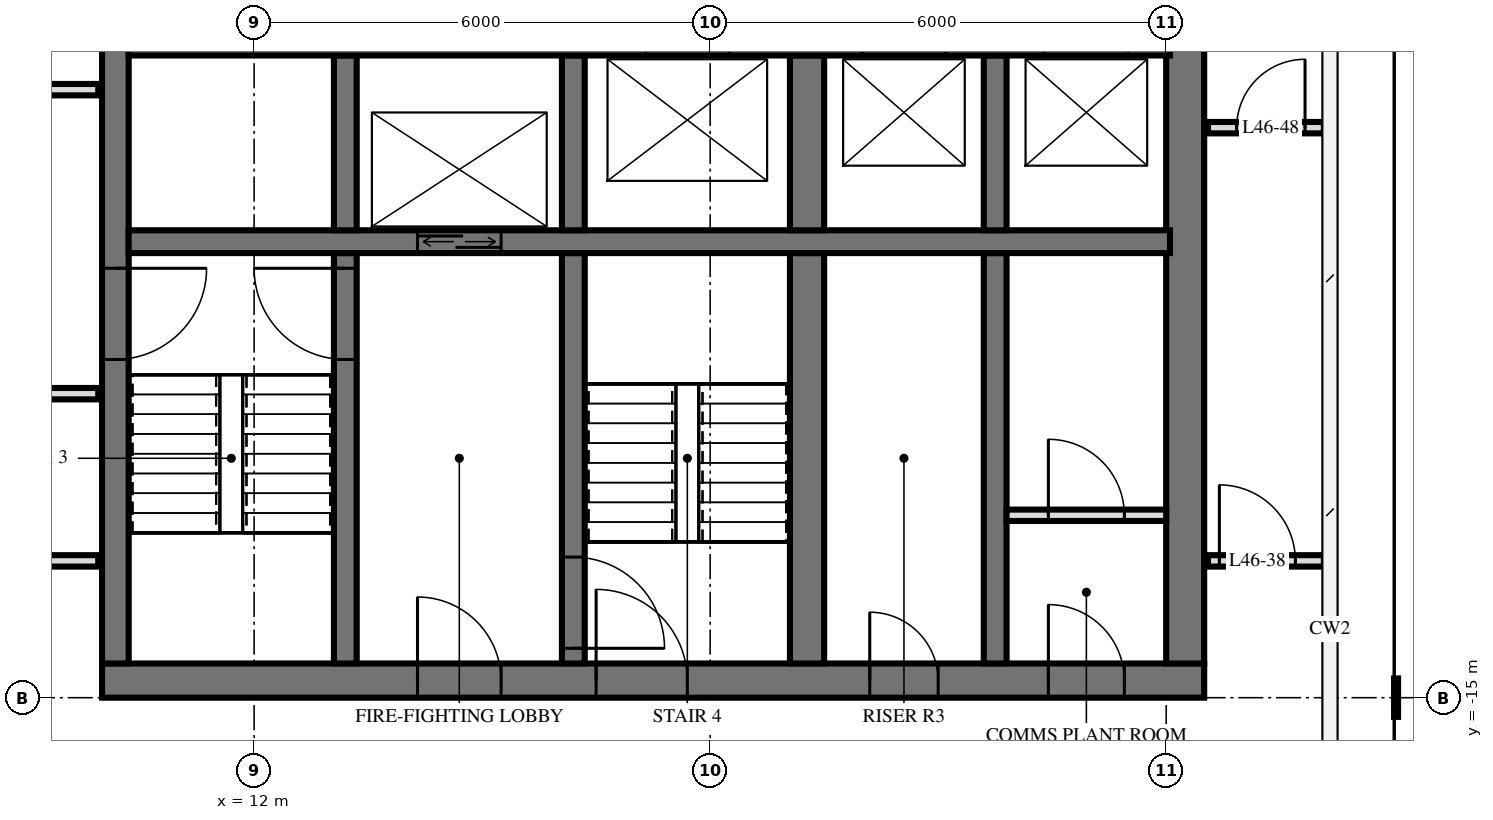
"""IFC4 building model, lengths in metres.
Left out: names, types, materials, properties, quantities, classifications, styles, units other than length and angle.
Written with IfcOpenShell. Run it as: python <this file> out.ifc"""

import sys

from ifc_helpers import new_model, si_unit, direction, frame, frame_2d, origin, place, context, subcontext, project, spatial, rectangle, extrude, element, fill, save


model = new_model("IFC4")
c1 = context("Model", 3, precision=1e-05, world=origin(), true_north=direction((0.0, 1.0)))
c2 = subcontext(c1, "Body", "Model", "MODEL_VIEW")
j1 = project(units=[si_unit("LENGTHUNIT", "METRE"), si_unit("PLANEANGLEUNIT", "RADIAN")], contexts=[c1])
p1 = place(None, origin())
s1 = spatial("IfcSite", under=j1, at=p1, CompositionType="ELEMENT")
p2 = place(p1, origin())
s2 = spatial("IfcBuilding", under=s1, at=p2, CompositionType="ELEMENT")
p3 = place(p2, frame((0.0, 0.0, 177.6)))
s3 = spatial("IfcBuildingStorey", under=s2, at=p3, CompositionType="ELEMENT", Elevation=177.6)
p4 = place(p3, frame((10.0, -14.775, 0.0), z_axis=(0.0, 0.0, 1.0), x_axis=(1.0, 0.0, 0.0)))
e1 = element("IfcWall", 1, at=p4, inside=s3, PredefinedType="SHEAR", context=c2, shape_type="SweptSolid", body=[
    extrude(rectangle(XDim=14.5, YDim=0.45, at=frame_2d((7.25, 0.0))), origin(), (0.0, 0.0, 1.0), 6.0),
])
p5 = place(p4, frame((6.5, 0.0, 0.0)))
e2 = element("IfcOpeningElement", 2, at=p5, cuts=e1, PredefinedType="OPENING", context=c2, shape_type="SweptSolid", body=[
    extrude(rectangle(XDim=1.2, YDim=2.1, at=frame_2d((0.6, 1.05))), frame((0.0, 0.235, 0.0), z_axis=(0.0, -1.0, 0.0), x_axis=(1.0, 0.0, 0.0)), (0.0, 0.0, 1.0), 0.47),
])
p6 = place(p4, frame((4.15, 0.0, 0.0)))
e3 = element("IfcOpeningElement", 3, at=p6, cuts=e1, PredefinedType="OPENING", context=c2, shape_type="SweptSolid", body=[
    extrude(rectangle(XDim=1.1, YDim=2.1, at=frame_2d((0.55, 1.05))), frame((0.0, 0.235, 0.0), z_axis=(0.0, -1.0, 0.0), x_axis=(1.0, 0.0, 0.0)), (0.0, 0.0, 1.0), 0.47),
])
p7 = place(p4, frame((10.1, 0.0, 0.0)))
e4 = element("IfcOpeningElement", 4, at=p7, cuts=e1, PredefinedType="OPENING", context=c2, shape_type="SweptSolid", body=[
    extrude(rectangle(XDim=0.9, YDim=2.1, at=frame_2d((0.45, 1.05))), frame((0.0, 0.235, 0.0), z_axis=(0.0, -1.0, 0.0), x_axis=(1.0, 0.0, 0.0)), (0.0, 0.0, 1.0), 0.47),
])
p8 = place(p4, frame((12.45, 0.0, 0.0)))
e5 = element("IfcOpeningElement", 5, at=p8, cuts=e1, PredefinedType="OPENING", context=c2, shape_type="SweptSolid", body=[
    extrude(rectangle(XDim=1.0, YDim=2.1, at=frame_2d((0.5, 1.05))), frame((0.0, 0.235, 0.0), z_axis=(0.0, -1.0, 0.0), x_axis=(1.0, 0.0, 0.0)), (0.0, 0.0, 1.0), 0.47),
])
p9 = place(p3, frame((10.175, -14.55, 0.0), z_axis=(0.0, 0.0, 1.0), x_axis=(0.0, 1.0, 0.0)))
e6 = element("IfcWall", 6, at=p9, inside=s3, PredefinedType="SHEAR", context=c2, shape_type="SweptSolid", body=[
    extrude(rectangle(XDim=14.1, YDim=0.35, at=frame_2d((7.05, 0.0))), origin(), (0.0, 0.0, 1.0), 6.0),
])
p10 = place(p9, frame((8.4, 0.0, 0.0)))
e7 = element("IfcOpeningElement", 7, at=p10, cuts=e6, PredefinedType="OPENING", context=c2, shape_type="SweptSolid", body=[
    extrude(rectangle(XDim=1.4, YDim=2.4, at=frame_2d((0.7, 1.2))), frame((0.0, 0.185, 0.0), z_axis=(0.0, -1.0, 0.0), x_axis=(1.0, 0.0, 0.0)), (0.0, 0.0, 1.0), 0.37),
])
p11 = place(p9, frame((10.0, 0.0, 0.0)))
e8 = element("IfcOpeningElement", 8, at=p11, cuts=e6, PredefinedType="OPENING", context=c2, shape_type="SweptSolid", body=[
    extrude(rectangle(XDim=1.4, YDim=2.4, at=frame_2d((0.7, 1.2))), frame((0.0, 0.185, 0.0), z_axis=(0.0, -1.0, 0.0), x_axis=(1.0, 0.0, 0.0)), (0.0, 0.0, 1.0), 0.37),
])
p12 = place(p9, frame((4.0, 0.0, 0.0)))
e9 = element("IfcOpeningElement", 9, at=p12, cuts=e6, PredefinedType="OPENING", context=c2, shape_type="SweptSolid", body=[
    extrude(rectangle(XDim=1.2, YDim=2.1, at=frame_2d((0.6, 1.05))), frame((0.0, 0.185, 0.0), z_axis=(0.0, -1.0, 0.0), x_axis=(1.0, 0.0, 0.0)), (0.0, 0.0, 1.0), 0.37),
])
p13 = place(p3, frame((24.25, -14.55, 0.0), z_axis=(0.0, 0.0, 1.0), x_axis=(0.0, 1.0, 0.0)))
e10 = element("IfcWall", 10, at=p13, inside=s3, PredefinedType="SHEAR", context=c2, shape_type="SweptSolid", body=[
    extrude(rectangle(XDim=14.1, YDim=0.5, at=frame_2d((7.05, 0.0))), origin(), (0.0, 0.0, 1.0), 6.0),
])
p14 = place(p3, frame((10.35, -6.4, 0.0), z_axis=(0.0, 0.0, 1.0), x_axis=(1.0, 0.0, 0.0)))
e11 = element("IfcWall", 11, at=p14, inside=s3, PredefinedType="SHEAR", context=c2, shape_type="SweptSolid", body=[
    extrude(rectangle(XDim=13.7, YDim=0.3, at=frame_2d((6.85, 0.0))), origin(), (0.0, 0.0, 1.0), 6.0),
])
p15 = place(p14, frame((9.65, 0.0, 0.0)))
e12 = element("IfcOpeningElement", 12, at=p15, cuts=e11, PredefinedType="OPENING", context=c2, shape_type="SweptSolid", body=[
    extrude(rectangle(XDim=1.1, YDim=2.1, at=frame_2d((0.55, 1.05))), frame((0.0, 0.16, 0.0), z_axis=(0.0, -1.0, 0.0), x_axis=(1.0, 0.0, 0.0)), (0.0, 0.0, 1.0), 0.32),
])
p16 = place(p14, frame((12.05, 0.0, 0.0)))
e13 = element("IfcOpeningElement", 13, at=p16, cuts=e11, PredefinedType="OPENING", context=c2, shape_type="SweptSolid", body=[
    extrude(rectangle(XDim=1.1, YDim=2.1, at=frame_2d((0.55, 1.05))), frame((0.0, 0.16, 0.0), z_axis=(0.0, -1.0, 0.0), x_axis=(1.0, 0.0, 0.0)), (0.0, 0.0, 1.0), 0.32),
])
p17 = place(p14, frame((6.8, 0.0, 0.0)))
e14 = element("IfcOpeningElement", 14, at=p17, cuts=e11, PredefinedType="OPENING", context=c2, shape_type="SweptSolid", body=[
    extrude(rectangle(XDim=1.1, YDim=2.1, at=frame_2d((0.55, 1.05))), frame((0.0, 0.16, 0.0), z_axis=(0.0, -1.0, 0.0), x_axis=(1.0, 0.0, 0.0)), (0.0, 0.0, 1.0), 0.32),
])
p18 = place(p3, frame((10.35, -9.0, 0.0), z_axis=(0.0, 0.0, 1.0), x_axis=(1.0, 0.0, 0.0)))
e15 = element("IfcWall", 15, at=p18, inside=s3, PredefinedType="SHEAR", context=c2, shape_type="SweptSolid", body=[
    extrude(rectangle(XDim=13.7, YDim=0.3, at=frame_2d((6.85, 0.0))), origin(), (0.0, 0.0, 1.0), 6.0),
])
p19 = place(p18, frame((3.8, 0.0, 0.0)))
e16 = element("IfcOpeningElement", 16, at=p19, cuts=e15, PredefinedType="OPENING", context=c2, shape_type="SweptSolid", body=[
    extrude(rectangle(XDim=1.1, YDim=2.1, at=frame_2d((0.55, 1.05))), frame((0.0, 0.16, 0.0), z_axis=(0.0, -1.0, 0.0), x_axis=(1.0, 0.0, 0.0)), (0.0, 0.0, 1.0), 0.32),
])
p20 = place(p3, frame((13.2, -8.85, 0.0), z_axis=(0.0, 0.0, 1.0), x_axis=(0.0, 1.0, 0.0)))
e17 = element("IfcWall", 17, at=p20, inside=s3, PredefinedType="SHEAR", context=c2, shape_type="SweptSolid", body=[
    extrude(rectangle(XDim=2.3, YDim=0.3, at=frame_2d((1.15, 0.0))), origin(), (0.0, 0.0, 1.0), 6.0),
])
p21 = place(p3, frame((13.2, -14.55, 0.0), z_axis=(0.0, 0.0, 1.0), x_axis=(0.0, 1.0, 0.0)))
e18 = element("IfcWall", 18, at=p21, inside=s3, PredefinedType="SHEAR", context=c2, shape_type="SweptSolid", body=[
    extrude(rectangle(XDim=5.4, YDim=0.3, at=frame_2d((2.7, 0.0))), origin(), (0.0, 0.0, 1.0), 6.0),
])
p22 = place(p21, frame((4.0, 0.0, 0.0)))
e19 = element("IfcOpeningElement", 19, at=p22, cuts=e18, PredefinedType="OPENING", context=c2, shape_type="SweptSolid", body=[
    extrude(rectangle(XDim=1.2, YDim=2.1, at=frame_2d((0.6, 1.05))), frame((0.0, 0.16, 0.0), z_axis=(0.0, -1.0, 0.0), x_axis=(1.0, 0.0, 0.0)), (0.0, 0.0, 1.0), 0.32),
])
p23 = place(p3, frame((16.2, -8.85, 0.0), z_axis=(0.0, 0.0, 1.0), x_axis=(0.0, 1.0, 0.0)))
e20 = element("IfcWall", 20, at=p23, inside=s3, PredefinedType="SHEAR", context=c2, shape_type="SweptSolid", body=[
    extrude(rectangle(XDim=2.3, YDim=0.3, at=frame_2d((1.15, 0.0))), origin(), (0.0, 0.0, 1.0), 6.0),
])
p24 = place(p3, frame((16.2, -14.55, 0.0), z_axis=(0.0, 0.0, 1.0), x_axis=(0.0, 1.0, 0.0)))
e21 = element("IfcWall", 21, at=p24, inside=s3, PredefinedType="SHEAR", context=c2, shape_type="SweptSolid", body=[
    extrude(rectangle(XDim=5.4, YDim=0.3, at=frame_2d((2.7, 0.0))), origin(), (0.0, 0.0, 1.0), 6.0),
])
p25 = place(p24, frame((0.2, 0.0, 0.0)))
e22 = element("IfcOpeningElement", 22, at=p25, cuts=e21, PredefinedType="OPENING", context=c2, shape_type="SweptSolid", body=[
    extrude(rectangle(XDim=1.2, YDim=2.1, at=frame_2d((0.6, 1.05))), frame((0.0, 0.16, 0.0), z_axis=(0.0, -1.0, 0.0), x_axis=(1.0, 0.0, 0.0)), (0.0, 0.0, 1.0), 0.32),
])
p26 = place(p3, frame((19.275, -8.85, 0.0), z_axis=(0.0, 0.0, 1.0), x_axis=(0.0, 1.0, 0.0)))
e23 = element("IfcWall", 23, at=p26, inside=s3, PredefinedType="SHEAR", context=c2, shape_type="SweptSolid", body=[
    extrude(rectangle(XDim=2.3, YDim=0.45, at=frame_2d((1.15, 0.0))), origin(), (0.0, 0.0, 1.0), 6.0),
])
p27 = place(p3, frame((19.275, -14.55, 0.0), z_axis=(0.0, 0.0, 1.0), x_axis=(0.0, 1.0, 0.0)))
e24 = element("IfcWall", 24, at=p27, inside=s3, PredefinedType="SHEAR", context=c2, shape_type="SweptSolid", body=[
    extrude(rectangle(XDim=5.4, YDim=0.45, at=frame_2d((2.7, 0.0))), origin(), (0.0, 0.0, 1.0), 6.0),
])
p28 = place(p3, frame((21.75, -8.85, 0.0), z_axis=(0.0, 0.0, 1.0), x_axis=(0.0, 1.0, 0.0)))
e25 = element("IfcWall", 25, at=p28, inside=s3, PredefinedType="SHEAR", context=c2, shape_type="SweptSolid", body=[
    extrude(rectangle(XDim=2.3, YDim=0.3, at=frame_2d((1.15, 0.0))), origin(), (0.0, 0.0, 1.0), 6.0),
])
p29 = place(p3, frame((21.75, -14.55, 0.0), z_axis=(0.0, 0.0, 1.0), x_axis=(0.0, 1.0, 0.0)))
e26 = element("IfcWall", 26, at=p29, inside=s3, PredefinedType="SHEAR", context=c2, shape_type="SweptSolid", body=[
    extrude(rectangle(XDim=5.4, YDim=0.3, at=frame_2d((2.7, 0.0))), origin(), (0.0, 0.0, 1.0), 6.0),
])
p30 = place(p3, frame((21.9, -12.6, 0.0), z_axis=(0.0, 0.0, 1.0), x_axis=(1.0, 0.0, 0.0)))
e27 = element("IfcWall", 27, at=p30, inside=s3, PredefinedType="PARTITIONING", context=c2, shape_type="SweptSolid", body=[
    extrude(rectangle(XDim=2.1, YDim=0.15, at=frame_2d((1.05, 0.0))), origin(), (0.0, 0.0, 1.0), 5.7),
])
p31 = place(p30, frame((0.55, 0.0, 0.0)))
e28 = element("IfcOpeningElement", 28, at=p31, cuts=e27, PredefinedType="OPENING", context=c2, shape_type="SweptSolid", body=[
    extrude(rectangle(XDim=1.0, YDim=2.1, at=frame_2d((0.5, 1.05))), frame((0.0, 0.085, 0.0), z_axis=(0.0, -1.0, 0.0), x_axis=(1.0, 0.0, 0.0)), (0.0, 0.0, 1.0), 0.17),
])
p32 = place(p3, frame((-9.95, -13.2, 0.0), z_axis=(0.0, 0.0, 1.0), x_axis=(1.0, 0.0, 0.0)))
e29 = element("IfcWall", 29, at=p32, inside=s3, PredefinedType="PARTITIONING", context=c2, shape_type="SweptSolid", body=[
    extrude(rectangle(XDim=19.9, YDim=0.15, at=frame_2d((9.95, 0.0))), origin(), (0.0, 0.0, 1.0), 5.7),
])
p33 = place(p32, frame((7.0, 0.0, 0.0)))
e30 = element("IfcOpeningElement", 30, at=p33, cuts=e29, PredefinedType="OPENING", context=c2, shape_type="SweptSolid", body=[
    extrude(rectangle(XDim=1.0, YDim=2.1, at=frame_2d((0.5, 1.05))), frame((0.0, 0.085, 0.0), z_axis=(0.0, -1.0, 0.0), x_axis=(1.0, 0.0, 0.0)), (0.0, 0.0, 1.0), 0.17),
])
p34 = place(p3, frame((24.55, -13.2, 0.0), z_axis=(0.0, 0.0, 1.0), x_axis=(1.0, 0.0, 0.0)))
e31 = element("IfcWall", 31, at=p34, inside=s3, PredefinedType="PARTITIONING", context=c2, shape_type="SweptSolid", body=[
    extrude(rectangle(XDim=1.525, YDim=0.15, at=frame_2d((0.762, 0.0))), origin(), (0.0, 0.0, 1.0), 5.7),
])
p35 = place(p34, frame((0.15, 0.0, 0.0)))
e32 = element("IfcOpeningElement", 32, at=p35, cuts=e31, PredefinedType="OPENING", context=c2, shape_type="SweptSolid", body=[
    extrude(rectangle(XDim=1.0, YDim=2.1, at=frame_2d((0.5, 1.05))), frame((0.0, 0.085, 0.0), z_axis=(0.0, -1.0, 0.0), x_axis=(1.0, 0.0, 0.0)), (0.0, 0.0, 1.0), 0.17),
])
p36 = place(p3, frame((-9.95, -11.0, 0.0), z_axis=(0.0, 0.0, 1.0), x_axis=(1.0, 0.0, 0.0)))
e33 = element("IfcWall", 33, at=p36, inside=s3, PredefinedType="PARTITIONING", context=c2, shape_type="SweptSolid", body=[
    extrude(rectangle(XDim=19.9, YDim=0.15, at=frame_2d((9.95, 0.0))), origin(), (0.0, 0.0, 1.0), 5.7),
])
p37 = place(p36, frame((9.45, 0.0, 0.0)))
e34 = element("IfcOpeningElement", 34, at=p37, cuts=e33, PredefinedType="OPENING", context=c2, shape_type="SweptSolid", body=[
    extrude(rectangle(XDim=1.0, YDim=2.1, at=frame_2d((0.5, 1.05))), frame((0.0, 0.085, 0.0), z_axis=(0.0, -1.0, 0.0), x_axis=(1.0, 0.0, 0.0)), (0.0, 0.0, 1.0), 0.17),
])
p38 = place(p36, frame((15.45, 0.0, 0.0)))
e35 = element("IfcOpeningElement", 35, at=p38, cuts=e33, PredefinedType="OPENING", context=c2, shape_type="SweptSolid", body=[
    extrude(rectangle(XDim=1.0, YDim=2.1, at=frame_2d((0.5, 1.05))), frame((0.0, 0.085, 0.0), z_axis=(0.0, -1.0, 0.0), x_axis=(1.0, 0.0, 0.0)), (0.0, 0.0, 1.0), 0.17),
])
p39 = place(p3, frame((24.55, -7.5, 0.0), z_axis=(0.0, 0.0, 1.0), x_axis=(1.0, 0.0, 0.0)))
e36 = element("IfcWall", 36, at=p39, inside=s3, PredefinedType="PARTITIONING", context=c2, shape_type="SweptSolid", body=[
    extrude(rectangle(XDim=1.525, YDim=0.15, at=frame_2d((0.762, 0.0))), origin(), (0.0, 0.0, 1.0), 5.7),
])
p40 = place(p39, frame((0.377, 0.0, 0.0)))
e37 = element("IfcOpeningElement", 37, at=p40, cuts=e36, PredefinedType="OPENING", context=c2, shape_type="SweptSolid", body=[
    extrude(rectangle(XDim=0.9, YDim=2.1, at=frame_2d((0.45, 1.05))), frame((0.0, 0.085, 0.0), z_axis=(0.0, -1.0, 0.0), x_axis=(1.0, 0.0, 0.0)), (0.0, 0.0, 1.0), 0.17),
])
p41 = place(p3, frame((-9.95, -7.0, 0.0), z_axis=(0.0, 0.0, 1.0), x_axis=(1.0, 0.0, 0.0)))
e38 = element("IfcWall", 38, at=p41, inside=s3, PredefinedType="PARTITIONING", context=c2, shape_type="SweptSolid", body=[
    extrude(rectangle(XDim=19.9, YDim=0.15, at=frame_2d((9.95, 0.0))), origin(), (0.0, 0.0, 1.0), 5.7),
])
p42 = place(p41, frame((9.45, 0.0, 0.0)))
e39 = element("IfcOpeningElement", 39, at=p42, cuts=e38, PredefinedType="OPENING", context=c2, shape_type="SweptSolid", body=[
    extrude(rectangle(XDim=1.0, YDim=2.1, at=frame_2d((0.5, 1.05))), frame((0.0, 0.085, 0.0), z_axis=(0.0, -1.0, 0.0), x_axis=(1.0, 0.0, 0.0)), (0.0, 0.0, 1.0), 0.17),
])
p43 = place(p41, frame((2.0, 0.0, 0.0)))
e40 = element("IfcOpeningElement", 40, at=p43, cuts=e38, PredefinedType="OPENING", context=c2, shape_type="SweptSolid", body=[
    extrude(rectangle(XDim=1.0, YDim=2.1, at=frame_2d((0.5, 1.05))), frame((0.0, 0.085, 0.0), z_axis=(0.0, -1.0, 0.0), x_axis=(1.0, 0.0, 0.0)), (0.0, 0.0, 1.0), 0.17),
])
p44 = place(p19, origin())
e41 = element("IfcDoor", 41, at=p44, inside=s3, OperationType="DOUBLE_DOOR_SLIDING", PredefinedType="USERDEFINED", context=c2, shape_type="SweptSolid", body=[
    extrude(rectangle(XDim=1.1, YDim=2.1, at=frame_2d((0.55, 1.05))), frame((0.0, 0.025, 0.0), z_axis=(0.0, -1.0, 0.0), x_axis=(1.0, 0.0, 0.0)), (0.0, 0.0, 1.0), 0.05),
])
fill(e16, e41)
p45 = place(p12, frame((0.6, 0.0, 0.0), z_axis=(0.0, 0.0, 1.0), x_axis=(-1.0, 0.0, 0.0)))
e42 = element("IfcDoor", 42, at=p45, inside=s3, OperationType="SINGLE_SWING_RIGHT", PredefinedType="DOOR", context=c2, shape_type="SweptSolid", body=[
    extrude(rectangle(XDim=1.2, YDim=2.1, at=frame_2d((0.0, 1.05))), frame((0.0, -0.025, 0.0), z_axis=(0.0, 1.0, 0.0), x_axis=(-1.0, 0.0, 0.0)), (0.0, 0.0, 1.0), 0.05),
])
fill(e9, e42)
p46 = place(p5, origin())
e43 = element("IfcDoor", 43, at=p46, inside=s3, OperationType="SINGLE_SWING_RIGHT", PredefinedType="DOOR", context=c2, shape_type="SweptSolid", body=[
    extrude(rectangle(XDim=1.2, YDim=2.1, at=frame_2d((0.6, 1.05))), frame((0.0, 0.025, 0.0), z_axis=(0.0, -1.0, 0.0), x_axis=(1.0, 0.0, 0.0)), (0.0, 0.0, 1.0), 0.05),
])
fill(e2, e43)
p47 = place(p6, origin())
e44 = element("IfcDoor", 44, at=p47, inside=s3, OperationType="SINGLE_SWING_RIGHT", PredefinedType="DOOR", context=c2, shape_type="SweptSolid", body=[
    extrude(rectangle(XDim=1.1, YDim=2.1, at=frame_2d((0.55, 1.05))), frame((0.0, 0.025, 0.0), z_axis=(0.0, -1.0, 0.0), x_axis=(1.0, 0.0, 0.0)), (0.0, 0.0, 1.0), 0.05),
])
fill(e3, e44)
p48 = place(p7, origin())
e45 = element("IfcDoor", 45, at=p48, inside=s3, OperationType="SINGLE_SWING_RIGHT", PredefinedType="DOOR", context=c2, shape_type="SweptSolid", body=[
    extrude(rectangle(XDim=0.9, YDim=2.1, at=frame_2d((0.45, 1.05))), frame((0.0, 0.025, 0.0), z_axis=(0.0, -1.0, 0.0), x_axis=(1.0, 0.0, 0.0)), (0.0, 0.0, 1.0), 0.05),
])
fill(e4, e45)
p49 = place(p8, origin())
e46 = element("IfcDoor", 46, at=p49, inside=s3, OperationType="SINGLE_SWING_RIGHT", PredefinedType="DOOR", context=c2, shape_type="SweptSolid", body=[
    extrude(rectangle(XDim=1.0, YDim=2.1, at=frame_2d((0.5, 1.05))), frame((0.0, 0.025, 0.0), z_axis=(0.0, -1.0, 0.0), x_axis=(1.0, 0.0, 0.0)), (0.0, 0.0, 1.0), 0.05),
])
fill(e5, e46)
p50 = place(p22, origin())
e47 = element("IfcDoor", 47, at=p50, inside=s3, OperationType="SINGLE_SWING_LEFT", PredefinedType="DOOR", context=c2, shape_type="SweptSolid", body=[
    extrude(rectangle(XDim=1.2, YDim=2.1, at=frame_2d((0.6, 1.05))), frame((0.0, 0.025, 0.0), z_axis=(0.0, -1.0, 0.0), x_axis=(1.0, 0.0, 0.0)), (0.0, 0.0, 1.0), 0.05),
])
fill(e19, e47)
p51 = place(p25, frame((0.6, 0.0, 0.0), z_axis=(0.0, 0.0, 1.0), x_axis=(-1.0, 0.0, 0.0)))
e48 = element("IfcDoor", 48, at=p51, inside=s3, OperationType="SINGLE_SWING_LEFT", PredefinedType="DOOR", context=c2, shape_type="SweptSolid", body=[
    extrude(rectangle(XDim=1.2, YDim=2.1, at=frame_2d((0.0, 1.05))), frame((0.0, -0.025, 0.0), z_axis=(0.0, 1.0, 0.0), x_axis=(-1.0, 0.0, 0.0)), (0.0, 0.0, 1.0), 0.05),
])
fill(e22, e48)
p52 = place(p31, origin())
e49 = element("IfcDoor", 49, at=p52, inside=s3, OperationType="SINGLE_SWING_RIGHT", PredefinedType="DOOR", context=c2, shape_type="SweptSolid", body=[
    extrude(rectangle(XDim=1.0, YDim=2.1, at=frame_2d((0.5, 1.05))), frame((0.0, 0.025, 0.0), z_axis=(0.0, -1.0, 0.0), x_axis=(1.0, 0.0, 0.0)), (0.0, 0.0, 1.0), 0.05),
])
fill(e28, e49)
p53 = place(p35, origin())
e50 = element("IfcDoor", 50, at=p53, inside=s3, OperationType="SINGLE_SWING_RIGHT", PredefinedType="DOOR", context=c2, shape_type="SweptSolid", body=[
    extrude(rectangle(XDim=1.0, YDim=2.1, at=frame_2d((0.5, 1.05))), frame((0.0, 0.025, 0.0), z_axis=(0.0, -1.0, 0.0), x_axis=(1.0, 0.0, 0.0)), (0.0, 0.0, 1.0), 0.05),
])
fill(e32, e50)
p54 = place(p40, origin())
e51 = element("IfcDoor", 51, at=p54, inside=s3, OperationType="SINGLE_SWING_LEFT", PredefinedType="DOOR", context=c2, shape_type="SweptSolid", body=[
    extrude(rectangle(XDim=0.9, YDim=2.1, at=frame_2d((0.45, 1.05))), frame((0.0, 0.025, 0.0), z_axis=(0.0, -1.0, 0.0), x_axis=(1.0, 0.0, 0.0)), (0.0, 0.0, 1.0), 0.05),
])
fill(e37, e51)
save(model, sys.argv[1])
